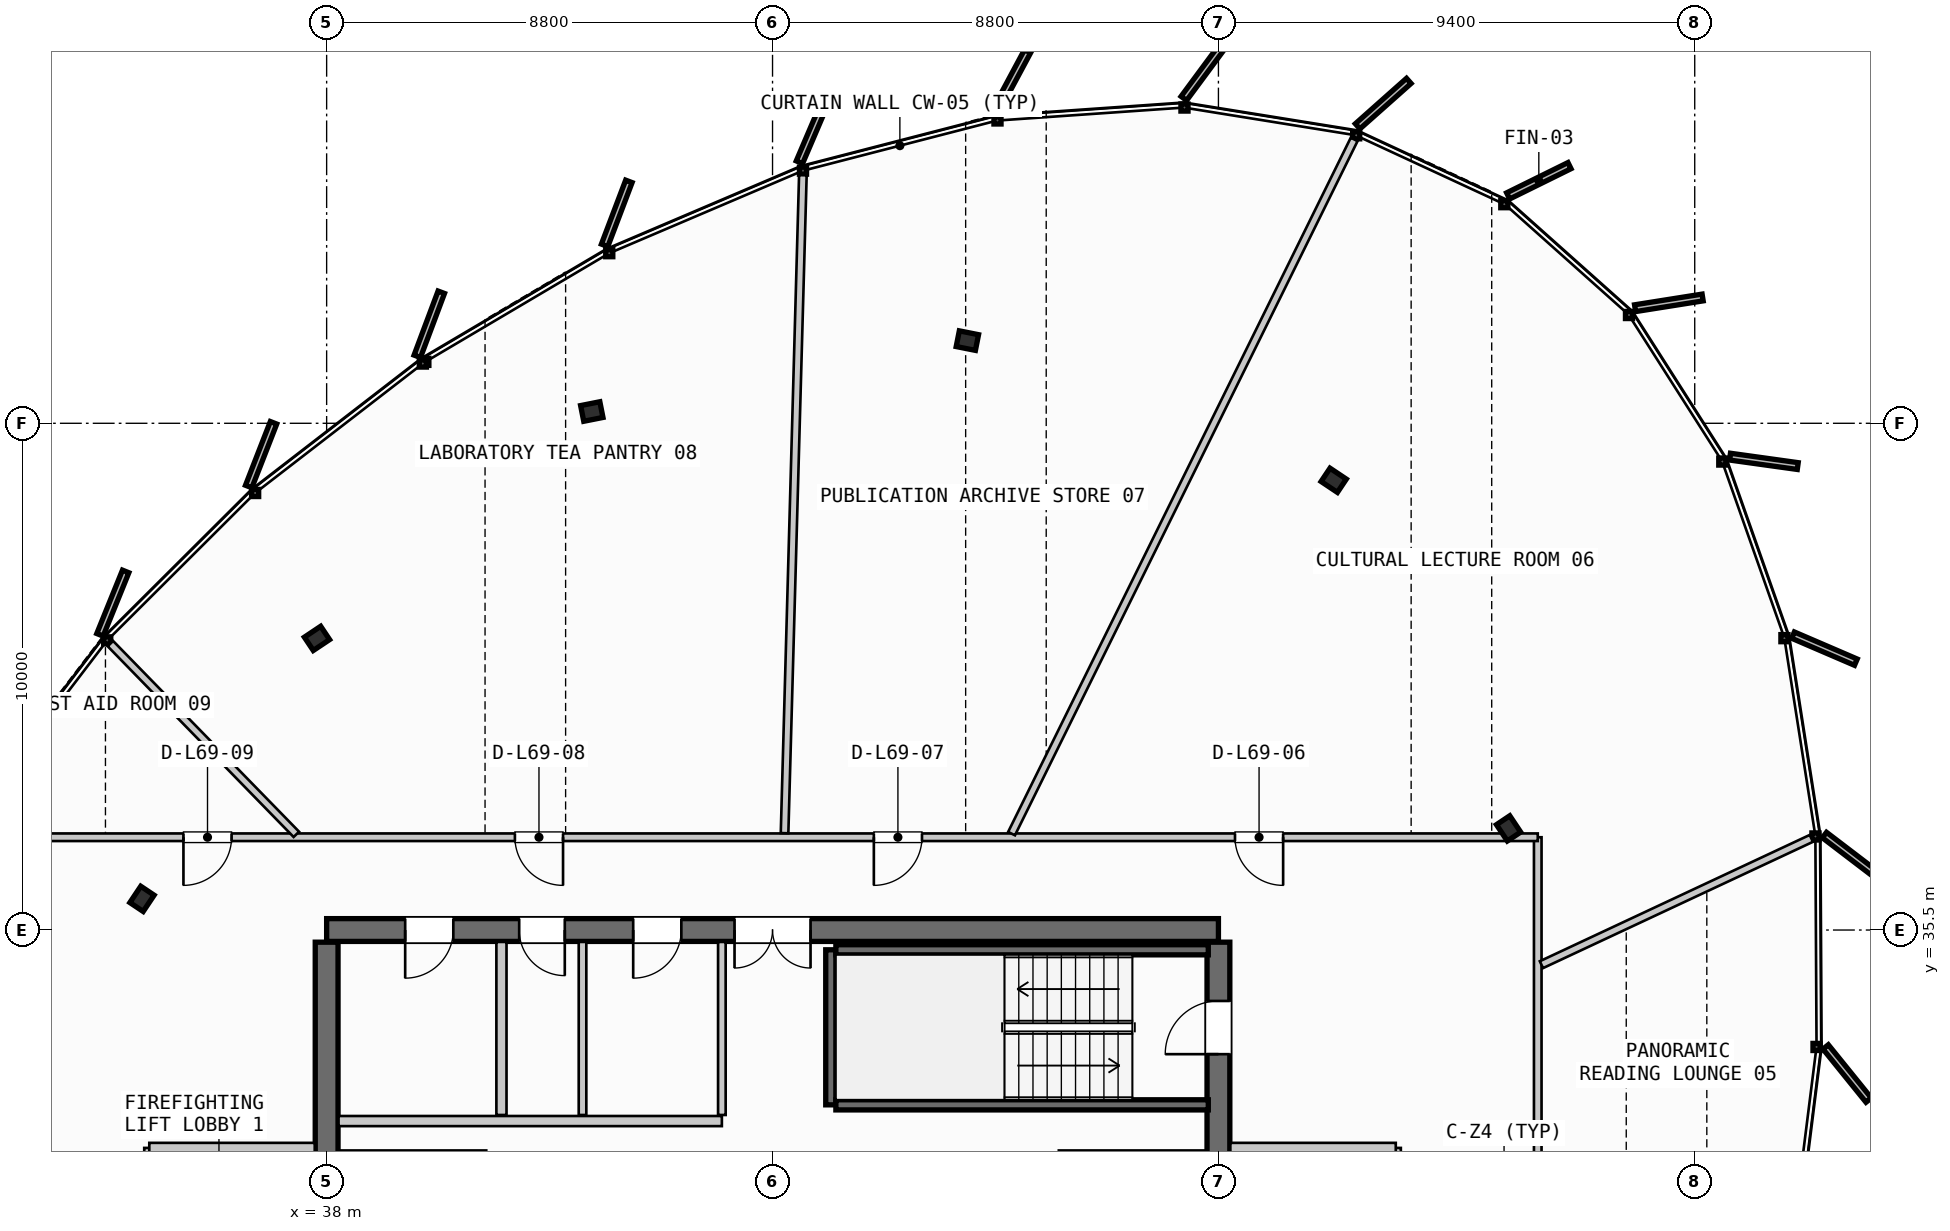
"""IFC4 building model, lengths in metres.
Left out: names, types, materials, properties, quantities, classifications, styles, units other than length and angle.
Written with IfcOpenShell. Run it as: python <this file> out.ifc"""

import sys

from ifc_helpers import new_model, si_unit, direction, frame, frame_2d, origin, origin_2d, place, context, subcontext, project, spatial, rectangle, i_section, extrude, source, transform, mapped, element, fill, save


model = new_model("IFC4")
c1 = context("Model", 3, precision=1e-05, world=origin(), true_north=direction((0.0, 1.0)))
c2 = subcontext(c1, "Body", "Model", "MODEL_VIEW")
j1 = project(units=[si_unit("LENGTHUNIT", "METRE"), si_unit("PLANEANGLEUNIT", "RADIAN")], contexts=[c1])
p1 = place(None, origin())
s1 = spatial("IfcSite", under=j1, at=p1, CompositionType="ELEMENT")
p2 = place(p1, origin())
s2 = spatial("IfcBuilding", under=s1, at=p2, CompositionType="ELEMENT")
p3 = place(p2, frame((0.0, 0.0, 262.9)))
s3 = spatial("IfcBuildingStorey", under=s2, at=p3, CompositionType="ELEMENT", Elevation=262.9)
p4 = place(p3, frame((55.6, 35.5, 0.0), z_axis=(0.0, 0.0, 1.0), x_axis=(-1.0, 0.0, 0.0)))
e1 = element("IfcWall", 1, at=p4, inside=s3, PredefinedType="SHEAR", context=c2, shape_type="SweptSolid", body=[
    extrude(rectangle(XDim=17.6, YDim=0.45, at=frame_2d((8.8, 0.0))), origin(), (0.0, 0.0, 1.0), 3.21),
])
p5 = place(p4, frame((8.05, 0.0, 0.0)))
e2 = element("IfcOpeningElement", 2, at=p5, cuts=e1, PredefinedType="OPENING", context=c2, shape_type="SweptSolid", body=[
    extrude(rectangle(XDim=1.5, YDim=2.2, at=frame_2d((0.75, 1.1))), frame((0.0, 0.235, 0.0), z_axis=(0.0, -1.0, 0.0), x_axis=(1.0, 0.0, 0.0)), (0.0, 0.0, 1.0), 0.47),
])
p6 = place(p4, frame((15.1, 0.0, 0.0)))
e3 = element("IfcOpeningElement", 3, at=p6, cuts=e1, PredefinedType="OPENING", context=c2, shape_type="SweptSolid", body=[
    extrude(rectangle(XDim=0.95, YDim=2.15, at=frame_2d((0.475, 1.075))), frame((0.0, 0.235, 0.0), z_axis=(0.0, -1.0, 0.0), x_axis=(1.0, 0.0, 0.0)), (0.0, 0.0, 1.0), 0.47),
])
p7 = place(p4, frame((12.9, 0.0, 0.0)))
e4 = element("IfcOpeningElement", 4, at=p7, cuts=e1, PredefinedType="OPENING", context=c2, shape_type="SweptSolid", body=[
    extrude(rectangle(XDim=0.9, YDim=2.15, at=frame_2d((0.45, 1.075))), frame((0.0, 0.235, 0.0), z_axis=(0.0, -1.0, 0.0), x_axis=(1.0, 0.0, 0.0)), (0.0, 0.0, 1.0), 0.47),
])
p8 = place(p4, frame((10.6, 0.0, 0.0)))
e5 = element("IfcOpeningElement", 5, at=p8, cuts=e1, PredefinedType="OPENING", context=c2, shape_type="SweptSolid", body=[
    extrude(rectangle(XDim=0.95, YDim=2.15, at=frame_2d((0.475, 1.075))), frame((0.0, 0.235, 0.0), z_axis=(0.0, -1.0, 0.0), x_axis=(1.0, 0.0, 0.0)), (0.0, 0.0, 1.0), 0.47),
])
p9 = place(p3, frame((38.0, 35.26, 0.0), z_axis=(0.0, 0.0, 1.0), x_axis=(0.0, -1.0, 0.0)))
e6 = element("IfcWall", 6, at=p9, inside=s3, PredefinedType="SHEAR", context=c2, shape_type="SweptSolid", body=[
    extrude(rectangle(XDim=14.92, YDim=0.45, at=frame_2d((7.46, 0.0))), origin(), (0.0, 0.0, 1.0), 3.21),
])
p10 = place(p9, frame((5.21, 0.0, 0.0)))
e7 = element("IfcOpeningElement", 7, at=p10, cuts=e6, PredefinedType="OPENING", context=c2, shape_type="SweptSolid", body=[
    extrude(rectangle(XDim=1.1, YDim=2.2, at=frame_2d((0.55, 1.1))), frame((0.0, 0.235, 0.0), z_axis=(0.0, -1.0, 0.0), x_axis=(1.0, 0.0, 0.0)), (0.0, 0.0, 1.0), 0.47),
])
p11 = place(p3, frame((55.6, 20.34, 0.0), z_axis=(0.0, 0.0, 1.0), x_axis=(0.0, 1.0, 0.0)))
e8 = element("IfcWall", 8, at=p11, inside=s3, PredefinedType="SHEAR", context=c2, shape_type="SweptSolid", body=[
    extrude(rectangle(XDim=14.92, YDim=0.45, at=frame_2d((7.46, 0.0))), origin(), (0.0, 0.0, 1.0), 3.21),
])
p12 = place(p11, frame((12.71, 0.0, 0.0)))
e9 = element("IfcOpeningElement", 9, at=p12, cuts=e8, PredefinedType="OPENING", context=c2, shape_type="SweptSolid", body=[
    extrude(rectangle(XDim=1.05, YDim=2.15, at=frame_2d((0.525, 1.075))), frame((0.0, 0.235, 0.0), z_axis=(0.0, -1.0, 0.0), x_axis=(1.0, 0.0, 0.0)), (0.0, 0.0, 1.0), 0.47),
])
p13 = place(p11, frame((8.61, 0.0, 0.0)))
e10 = element("IfcOpeningElement", 10, at=p13, cuts=e8, PredefinedType="OPENING", context=c2, shape_type="SweptSolid", body=[
    extrude(rectangle(XDim=1.1, YDim=2.2, at=frame_2d((0.55, 1.1))), frame((0.0, 0.235, 0.0), z_axis=(0.0, -1.0, 0.0), x_axis=(1.0, 0.0, 0.0)), (0.0, 0.0, 1.0), 0.47),
])
m1 = source(origin(), c2, "Body", "SweptSolid", [
    extrude(i_section(OverallWidth=0.387, OverallDepth=0.316, WebThickness=0.019, FlangeThickness=0.028, FilletRadius=0.015, at=origin_2d()), origin(), (0.0, 0.0, 1.0), 3.21),
])
for number, where, z_axis, x_axis in (
    (11, (61.326, 37.506, 0.0), (0.0, 0.0, 1.0), (0.831, 0.556, 0.0)),
    (12, (57.875, 44.375, 0.0), (0.0, 0.0, 1.0), (0.556, 0.831, 0.0)),
    (13, (50.645, 47.132, 0.0), (0.0, 0.0, 1.0), (0.195, 0.981, 0.0)),
    (14, (43.233, 45.732, 0.0), (0.0, 0.0, 1.0), (-0.195, 0.981, 0.0)),
    (15, (37.81, 41.255, 0.0), (0.0, 0.0, 1.0), (-0.556, 0.831, 0.0)),
    (16, (34.356, 36.115, 0.0), (0.0, 0.0, 1.0), (-0.831, 0.556, 0.0)),
):
    element("IfcColumn", number, at=place(p3, frame(where, z_axis=z_axis, x_axis=x_axis)), inside=s3, PredefinedType="COLUMN", context=c2, shape_type="MappedRepresentation", body=[
        mapped(m1, transform((0.0, 0.0, 0.0), scale=1.0)),
    ])
p14 = place(p3, frame((47.95, 32.05, 0.0), z_axis=(0.0, 0.0, 1.0), x_axis=(0.0, 1.0, 0.0)))
e17 = element("IfcWall", 17, at=p14, inside=s3, PredefinedType="SHEAR", context=c2, shape_type="SweptSolid", body=[
    extrude(rectangle(XDim=3.06, YDim=0.2, at=frame_2d((1.53, 0.0))), origin(), (0.0, 0.0, 1.0), 3.21),
])
for number, where, z_axis, x_axis in (
    (18, (48.05, 35.11, 0.0), (0.0, 0.0, 1.0), (1.0, 0.0, 0.0)),
    (19, (55.4, 32.05, 0.0), (0.0, 0.0, 1.0), (-1.0, 0.0, 0.0)),
):
    element("IfcWall", number, at=place(p3, frame(where, z_axis=z_axis, x_axis=x_axis)), inside=s3, PredefinedType="SHEAR", context=c2, shape_type="SweptSolid", body=[
        extrude(rectangle(XDim=7.35, YDim=0.2, at=frame_2d((3.675, 0.0))), origin(), (0.0, 0.0, 1.0), 3.21),
    ])
p15 = place(p3, frame((38.235, 31.05, 0.0), z_axis=(0.0, 0.0, 1.0), x_axis=(1.0, 0.0, 0.0)))
e20 = element("IfcWall", 20, at=p15, inside=s3, PredefinedType="PARTITIONING", context=c2, shape_type="SweptSolid", body=[
    extrude(rectangle(XDim=2.915, YDim=0.2, at=frame_2d((1.458, 0.0))), origin(), (0.0, 0.0, 1.0), 2.735),
])
p16 = place(p3, frame((34.5, 31.2, 0.0), z_axis=(0.0, 0.0, 1.0), x_axis=(0.0, -1.0, 0.0)))
e21 = element("IfcWall", 21, at=p16, inside=s3, PredefinedType="PARTITIONING", context=c2, shape_type="SweptSolid", body=[
    extrude(rectangle(XDim=4.4, YDim=0.2, at=frame_2d((2.2, 0.0))), origin(), (0.0, 0.0, 1.0), 2.735),
])
p17 = place(p16, frame((1.65, 0.0, 0.0)))
e22 = element("IfcOpeningElement", 22, at=p17, cuts=e21, PredefinedType="OPENING", context=c2, shape_type="SweptSolid", body=[
    extrude(rectangle(XDim=1.05, YDim=2.15, at=frame_2d((0.525, 1.075))), frame((0.0, 0.11, 0.0), z_axis=(0.0, -1.0, 0.0), x_axis=(1.0, 0.0, 0.0)), (0.0, 0.0, 1.0), 0.22),
])
p18 = place(p3, frame((34.5, 31.2, 0.0), z_axis=(0.0, 0.0, 1.0), x_axis=(1.0, 0.0, 0.0)))
e23 = element("IfcWall", 23, at=p18, inside=s3, PredefinedType="PARTITIONING", context=c2, shape_type="SweptSolid", body=[
    extrude(rectangle(XDim=3.265, YDim=0.2, at=frame_2d((1.632, 0.0))), origin(), (0.0, 0.0, 1.0), 2.735),
])
p19 = place(p3, frame((52.45, 31.05, 0.0), z_axis=(0.0, 0.0, 1.0), x_axis=(1.0, 0.0, 0.0)))
e24 = element("IfcWall", 24, at=p19, inside=s3, PredefinedType="PARTITIONING", context=c2, shape_type="SweptSolid", body=[
    extrude(rectangle(XDim=2.915, YDim=0.2, at=frame_2d((1.458, 0.0))), origin(), (0.0, 0.0, 1.0), 2.735),
])
p20 = place(p3, frame((59.1, 26.8, 0.0), z_axis=(0.0, 0.0, 1.0), x_axis=(0.0, 1.0, 0.0)))
e25 = element("IfcWall", 25, at=p20, inside=s3, PredefinedType="PARTITIONING", context=c2, shape_type="SweptSolid", body=[
    extrude(rectangle(XDim=4.4, YDim=0.2, at=frame_2d((2.2, 0.0))), origin(), (0.0, 0.0, 1.0), 2.735),
])
p21 = place(p20, frame((1.65, 0.0, 0.0)))
e26 = element("IfcOpeningElement", 26, at=p21, cuts=e25, PredefinedType="OPENING", context=c2, shape_type="SweptSolid", body=[
    extrude(rectangle(XDim=1.05, YDim=2.15, at=frame_2d((0.525, 1.075))), frame((0.0, 0.11, 0.0), z_axis=(0.0, -1.0, 0.0), x_axis=(1.0, 0.0, 0.0)), (0.0, 0.0, 1.0), 0.22),
])
p22 = place(p3, frame((55.835, 31.2, 0.0), z_axis=(0.0, 0.0, 1.0), x_axis=(1.0, 0.0, 0.0)))
e27 = element("IfcWall", 27, at=p22, inside=s3, PredefinedType="PARTITIONING", context=c2, shape_type="SweptSolid", body=[
    extrude(rectangle(XDim=3.265, YDim=0.2, at=frame_2d((1.633, 0.0))), origin(), (0.0, 0.0, 1.0), 2.735),
])
p23 = place(p3, frame((41.45, 31.85, 0.0), z_axis=(0.0, 0.0, 1.0), x_axis=(0.0, 1.0, 0.0)))
e28 = element("IfcWall", 28, at=p23, inside=s3, PredefinedType="PARTITIONING", context=c2, shape_type="SweptSolid", body=[
    extrude(rectangle(XDim=3.415, YDim=0.2, at=frame_2d((1.708, 0.0))), origin(), (0.0, 0.0, 1.0), 2.735),
])
p24 = place(p3, frame((38.235, 31.73, 0.0), z_axis=(0.0, 0.0, 1.0), x_axis=(1.0, 0.0, 0.0)))
e29 = element("IfcWall", 29, at=p24, inside=s3, PredefinedType="PARTITIONING", context=c2, shape_type="SweptSolid", body=[
    extrude(rectangle(XDim=7.565, YDim=0.2, at=frame_2d((3.782, 0.0))), origin(), (0.0, 0.0, 1.0), 2.735),
])
p25 = place(p3, frame((45.8, 31.85, 0.0), z_axis=(0.0, 0.0, 1.0), x_axis=(0.0, 1.0, 0.0)))
e30 = element("IfcWall", 30, at=p25, inside=s3, PredefinedType="PARTITIONING", context=c2, shape_type="SweptSolid", body=[
    extrude(rectangle(XDim=3.415, YDim=0.15, at=frame_2d((1.708, 0.0))), origin(), (0.0, 0.0, 1.0), 2.735),
])
p26 = place(p3, frame((43.05, 31.85, 0.0), z_axis=(0.0, 0.0, 1.0), x_axis=(0.0, 1.0, 0.0)))
e31 = element("IfcWall", 31, at=p26, inside=s3, PredefinedType="PLUMBINGWALL", context=c2, shape_type="SweptSolid", body=[
    extrude(rectangle(XDim=3.415, YDim=0.15, at=frame_2d((1.708, 0.0))), origin(), (0.0, 0.0, 1.0), 2.735),
])
p27 = place(p3, frame((61.902, 17.807, 0.0), z_axis=(0.0, 0.0, 1.0), x_axis=(0.0, 1.0, 0.0)))
e32 = element("IfcWall", 32, at=p27, inside=s3, PredefinedType="PARTITIONING", context=c2, shape_type="SweptSolid", body=[
    extrude(rectangle(XDim=19.524, YDim=0.15, at=frame_2d((9.762, 0.0))), origin(), (0.0, 0.0, 1.0), 2.735),
])
p28 = place(p27, frame((10.111, 0.0, 0.0)))
e33 = element("IfcOpeningElement", 33, at=p28, cuts=e32, PredefinedType="OPENING", context=c2, shape_type="SweptSolid", body=[
    extrude(rectangle(XDim=0.95, YDim=2.15, at=frame_2d((0.475, 1.075))), frame((0.0, 0.085, 0.0), z_axis=(0.0, -1.0, 0.0), x_axis=(1.0, 0.0, 0.0)), (0.0, 0.0, 1.0), 0.17),
])
p29 = place(p3, frame((61.902, 37.331, 0.0), z_axis=(0.0, 0.0, 1.0), x_axis=(-1.0, 0.0, 0.0)))
e34 = element("IfcWall", 34, at=p29, inside=s3, PredefinedType="PARTITIONING", context=c2, shape_type="SweptSolid", body=[
    extrude(rectangle(XDim=29.442, YDim=0.15, at=frame_2d((14.721, 0.0))), origin(), (0.0, 0.0, 1.0), 2.735),
])
p30 = place(p29, frame((5.025, 0.0, 0.0)))
e35 = element("IfcOpeningElement", 35, at=p30, cuts=e34, PredefinedType="OPENING", context=c2, shape_type="SweptSolid", body=[
    extrude(rectangle(XDim=0.95, YDim=2.15, at=frame_2d((0.475, 1.075))), frame((0.0, 0.085, 0.0), z_axis=(0.0, -1.0, 0.0), x_axis=(1.0, 0.0, 0.0)), (0.0, 0.0, 1.0), 0.17),
])
p31 = place(p29, frame((12.153, 0.0, 0.0)))
e36 = element("IfcOpeningElement", 36, at=p31, cuts=e34, PredefinedType="OPENING", context=c2, shape_type="SweptSolid", body=[
    extrude(rectangle(XDim=0.95, YDim=2.15, at=frame_2d((0.475, 1.075))), frame((0.0, 0.085, 0.0), z_axis=(0.0, -1.0, 0.0), x_axis=(1.0, 0.0, 0.0)), (0.0, 0.0, 1.0), 0.17),
])
p32 = place(p29, frame((19.237, 0.0, 0.0)))
e37 = element("IfcOpeningElement", 37, at=p32, cuts=e34, PredefinedType="OPENING", context=c2, shape_type="SweptSolid", body=[
    extrude(rectangle(XDim=0.95, YDim=2.15, at=frame_2d((0.475, 1.075))), frame((0.0, 0.085, 0.0), z_axis=(0.0, -1.0, 0.0), x_axis=(1.0, 0.0, 0.0)), (0.0, 0.0, 1.0), 0.17),
])
p33 = place(p29, frame((25.778, 0.0, 0.0)))
e38 = element("IfcOpeningElement", 38, at=p33, cuts=e34, PredefinedType="OPENING", context=c2, shape_type="SweptSolid", body=[
    extrude(rectangle(XDim=0.95, YDim=2.15, at=frame_2d((0.475, 1.075))), frame((0.0, 0.085, 0.0), z_axis=(0.0, -1.0, 0.0), x_axis=(1.0, 0.0, 0.0)), (0.0, 0.0, 1.0), 0.17),
])
p34 = place(p3, frame((61.975, 34.816, 0.0), z_axis=(0.0, 0.0, 1.0), x_axis=(0.905765848745, 0.423778512016, 0.0)))
e39 = element("IfcWall", 39, at=p34, inside=s3, PredefinedType="PARTITIONING", context=c2, shape_type="SweptSolid", body=[
    extrude(rectangle(XDim=5.88, YDim=0.15, at=frame_2d((2.94, 0.0))), origin(), (0.0, 0.0, 1.0), 2.735),
])
p35 = place(p3, frame((51.517, 37.403, 0.0), z_axis=(0.0, 0.0, 1.0), x_axis=(0.442592509331, 0.896722850542, 0.0)))
e40 = element("IfcWall", 40, at=p35, inside=s3, PredefinedType="PARTITIONING", context=c2, shape_type="SweptSolid", body=[
    extrude(rectangle(XDim=15.278, YDim=0.15, at=frame_2d((7.639, 0.0))), origin(), (0.0, 0.0, 1.0), 2.735),
])
p36 = place(p3, frame((47.037, 37.411, 0.0), z_axis=(0.0, 0.0, 1.0), x_axis=(0.027816104328, 0.999613057308, 0.0)))
e41 = element("IfcWall", 41, at=p36, inside=s3, PredefinedType="PARTITIONING", context=c2, shape_type="SweptSolid", body=[
    extrude(rectangle(XDim=12.99, YDim=0.15, at=frame_2d((6.495, 0.0))), origin(), (0.0, 0.0, 1.0), 2.735),
])
p37 = place(p3, frame((37.402, 37.388, 0.0), z_axis=(0.0, 0.0, 1.0), x_axis=(-0.698109660125, 0.715990853601, 0.0)))
e42 = element("IfcWall", 42, at=p37, inside=s3, PredefinedType="PARTITIONING", context=c2, shape_type="SweptSolid", body=[
    extrude(rectangle(XDim=5.257, YDim=0.15, at=frame_2d((2.628, 0.0))), origin(), (0.0, 0.0, 1.0), 2.735),
])
m2 = source(origin(), c2, "Body", "SweptSolid", [
    extrude(rectangle(XDim=1.05, YDim=2.15, at=frame_2d((0.525, 1.075))), frame((0.0, 0.025, 0.0), z_axis=(0.0, -1.0, 0.0), x_axis=(1.0, 0.0, 0.0)), (0.0, 0.0, 1.0), 0.05),
])
p38 = place(p12, origin())
e43 = element("IfcDoor", 43, at=p38, inside=s3, OperationType="SINGLE_SWING_LEFT", PredefinedType="DOOR", context=c2, shape_type="MappedRepresentation", body=[
    mapped(m2, transform((0.0, 0.0, 0.0), scale=1.0)),
])
fill(e9, e43)
m3 = source(origin(), c2, "Body", "SweptSolid", [
    extrude(rectangle(XDim=1.5, YDim=2.2, at=frame_2d((0.75, 1.1))), frame((0.0, 0.025, 0.0), z_axis=(0.0, -1.0, 0.0), x_axis=(1.0, 0.0, 0.0)), (0.0, 0.0, 1.0), 0.05),
])
p39 = place(p5, origin())
e44 = element("IfcDoor", 44, at=p39, inside=s3, OperationType="DOUBLE_DOOR_SINGLE_SWING", PredefinedType="DOOR", context=c2, shape_type="MappedRepresentation", body=[
    mapped(m3, transform((0.0, 0.0, 0.0), scale=1.0)),
])
fill(e2, e44)
m4 = source(origin(), c2, "Body", "SweptSolid", [
    extrude(rectangle(XDim=0.95, YDim=2.15, at=frame_2d((0.475, 1.075))), frame((0.0, 0.025, 0.0), z_axis=(0.0, -1.0, 0.0), x_axis=(1.0, 0.0, 0.0)), (0.0, 0.0, 1.0), 0.05),
])
p40 = place(p6, origin())
e45 = element("IfcDoor", 45, at=p40, inside=s3, OperationType="SINGLE_SWING_RIGHT", PredefinedType="DOOR", context=c2, shape_type="MappedRepresentation", body=[
    mapped(m4, transform((0.0, 0.0, 0.0), scale=1.0)),
])
fill(e3, e45)
m5 = source(origin(), c2, "Body", "SweptSolid", [
    extrude(rectangle(XDim=0.9, YDim=2.15, at=frame_2d((0.45, 1.075))), frame((0.0, 0.025, 0.0), z_axis=(0.0, -1.0, 0.0), x_axis=(1.0, 0.0, 0.0)), (0.0, 0.0, 1.0), 0.05),
])
p41 = place(p7, origin())
e46 = element("IfcDoor", 46, at=p41, inside=s3, OperationType="SINGLE_SWING_LEFT", PredefinedType="DOOR", context=c2, shape_type="MappedRepresentation", body=[
    mapped(m5, transform((0.0, 0.0, 0.0), scale=1.0)),
])
fill(e4, e46)
p42 = place(p8, origin())
e47 = element("IfcDoor", 47, at=p42, inside=s3, OperationType="SINGLE_SWING_RIGHT", PredefinedType="DOOR", context=c2, shape_type="MappedRepresentation", body=[
    mapped(m4, transform((0.0, 0.0, 0.0), scale=1.0)),
])
fill(e5, e47)
p43 = place(p30, origin())
e48 = element("IfcDoor", 48, at=p43, inside=s3, OperationType="SINGLE_SWING_LEFT", PredefinedType="DOOR", context=c2, shape_type="MappedRepresentation", body=[
    mapped(m4, transform((0.0, 0.0, 0.0), scale=1.0)),
])
fill(e35, e48)
p44 = place(p31, origin())
e49 = element("IfcDoor", 49, at=p44, inside=s3, OperationType="SINGLE_SWING_RIGHT", PredefinedType="DOOR", context=c2, shape_type="MappedRepresentation", body=[
    mapped(m4, transform((0.0, 0.0, 0.0), scale=1.0)),
])
fill(e36, e49)
p45 = place(p32, origin())
e50 = element("IfcDoor", 50, at=p45, inside=s3, OperationType="SINGLE_SWING_LEFT", PredefinedType="DOOR", context=c2, shape_type="MappedRepresentation", body=[
    mapped(m4, transform((0.0, 0.0, 0.0), scale=1.0)),
])
fill(e37, e50)
p46 = place(p33, origin())
e51 = element("IfcDoor", 51, at=p46, inside=s3, OperationType="SINGLE_SWING_RIGHT", PredefinedType="DOOR", context=c2, shape_type="MappedRepresentation", body=[
    mapped(m4, transform((0.0, 0.0, 0.0), scale=1.0)),
])
fill(e38, e51)
save(model, sys.argv[1])
